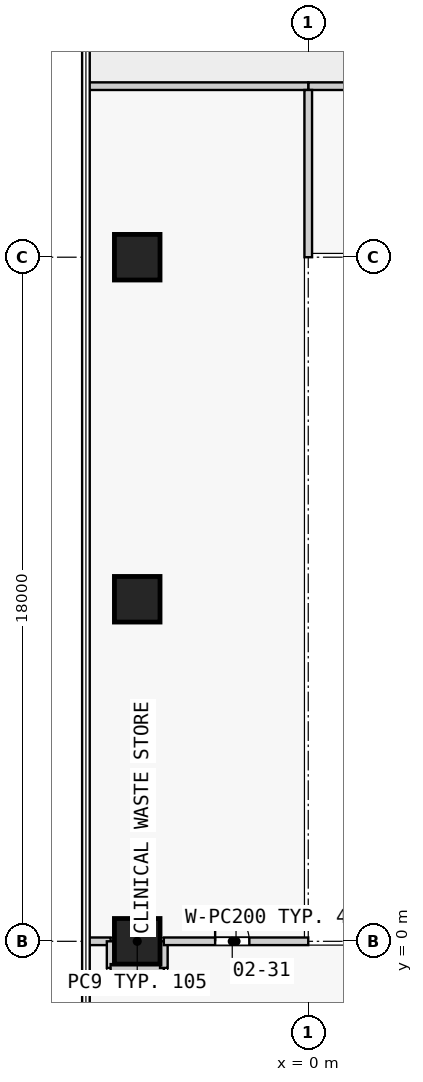
"""IFC4 building model, lengths in metres.
Left out: names, types, materials, properties, quantities, classifications, styles, units other than length and angle.
Written with IfcOpenShell. Run it as: python <this file> out.ifc"""

import sys

from ifc_helpers import new_model, si_unit, direction, frame, frame_2d, origin, origin_2d, place, context, subcontext, project, spatial, rectangle, extrude, element, fill, save


model = new_model("IFC4")
c1 = context("Model", 3, precision=1e-05, world=origin(), true_north=direction((0.0, 1.0)))
c2 = subcontext(c1, "Body", "Model", "MODEL_VIEW")
j1 = project(units=[si_unit("LENGTHUNIT", "METRE"), si_unit("PLANEANGLEUNIT", "RADIAN")], contexts=[c1])
p1 = place(None, origin())
s1 = spatial("IfcSite", under=j1, at=p1, CompositionType="ELEMENT")
p2 = place(p1, origin())
s2 = spatial("IfcBuilding", under=s1, at=p2, CompositionType="ELEMENT")
p3 = place(p2, frame((0.0, 0.0, 12.8)))
s3 = spatial("IfcBuildingStorey", under=s2, at=p3, CompositionType="ELEMENT", Elevation=12.8)
for number, where, z_axis, x_axis in (
    (1, (-4.5, 0.0, 0.0), (0.0, 0.0, 1.0), (1.0, 0.0, 0.0)),
    (2, (-4.5, 9.0, 0.0), (0.0, 0.0, 1.0), (1.0, 0.0, 0.0)),
    (3, (-4.5, 18.0, 0.0), (0.0, 0.0, 1.0), (1.0, 0.0, 0.0)),
):
    element("IfcColumn", number, at=place(p3, frame(where, z_axis=z_axis, x_axis=x_axis)), inside=s3, PredefinedType="COLUMN", context=c2, shape_type="SweptSolid", body=[
        extrude(rectangle(XDim=1.2, YDim=1.2, at=origin_2d()), origin(), (0.0, 0.0, 1.0), 4.5),
    ])
p4 = place(p3, frame((0.0, 22.5, 0.0), z_axis=(0.0, 0.0, 1.0), x_axis=(1.0, 0.0, 0.0)))
e4 = element("IfcWall", 4, at=p4, inside=s3, PredefinedType="PARTITIONING", context=c2, shape_type="SweptSolid", body=[
    extrude(rectangle(XDim=22.5, YDim=0.2, at=frame_2d((11.25, 0.0))), origin(), (0.0, 0.0, 1.0), 4.15),
])
p5 = place(p4, frame((10.35, 0.0, 0.0)))
e5 = element("IfcOpeningElement", 5, at=p5, cuts=e4, PredefinedType="OPENING", context=c2, shape_type="SweptSolid", body=[
    extrude(rectangle(XDim=1.8, YDim=2.1, at=frame_2d((0.9, 1.05))), frame((0.0, 0.11, 0.0), z_axis=(0.0, -1.0, 0.0), x_axis=(1.0, 0.0, 0.0)), (0.0, 0.0, 1.0), 0.22),
])
p6 = place(p3, frame((-5.85, 0.0, 0.0), z_axis=(0.0, 0.0, 1.0), x_axis=(1.0, 0.0, 0.0)))
e6 = element("IfcWall", 6, at=p6, inside=s3, PredefinedType="PARTITIONING", context=c2, shape_type="SweptSolid", body=[
    extrude(rectangle(XDim=0.65, YDim=0.2, at=frame_2d((0.325, 0.0))), origin(), (0.0, 0.0, 1.0), 4.15),
])
p7 = place(p3, frame((-5.2, 0.0, 0.0), z_axis=(0.0, 0.0, 1.0), x_axis=(0.0, -1.0, 0.0)))
e7 = element("IfcWall", 7, at=p7, inside=s3, PredefinedType="PARTITIONING", context=c2, shape_type="SweptSolid", body=[
    extrude(rectangle(XDim=0.7, YDim=0.2, at=frame_2d((0.35, 0.0))), origin(), (0.0, 0.0, 1.0), 4.15),
])
p8 = place(p3, frame((-5.2, -0.7, 0.0), z_axis=(0.0, 0.0, 1.0), x_axis=(1.0, 0.0, 0.0)))
e8 = element("IfcWall", 8, at=p8, inside=s3, PredefinedType="PARTITIONING", context=c2, shape_type="SweptSolid", body=[
    extrude(rectangle(XDim=1.4, YDim=0.2, at=frame_2d((0.7, 0.0))), origin(), (0.0, 0.0, 1.0), 3.45),
])
p9 = place(p3, frame((-3.8, -0.7, 0.0), z_axis=(0.0, 0.0, 1.0), x_axis=(0.0, 1.0, 0.0)))
e9 = element("IfcWall", 9, at=p9, inside=s3, PredefinedType="PARTITIONING", context=c2, shape_type="SweptSolid", body=[
    extrude(rectangle(XDim=0.7, YDim=0.2, at=frame_2d((0.35, 0.0))), origin(), (0.0, 0.0, 1.0), 4.15),
])
p10 = place(p3, frame((-3.8, 0.0, 0.0), z_axis=(0.0, 0.0, 1.0), x_axis=(1.0, 0.0, 0.0)))
e10 = element("IfcWall", 10, at=p10, inside=s3, PredefinedType="PARTITIONING", context=c2, shape_type="SweptSolid", body=[
    extrude(rectangle(XDim=3.8, YDim=0.2, at=frame_2d((1.9, 0.0))), origin(), (0.0, 0.0, 1.0), 4.15),
])
p11 = place(p10, frame((1.35, 0.0, 0.0)))
e11 = element("IfcOpeningElement", 11, at=p11, cuts=e10, PredefinedType="OPENING", context=c2, shape_type="SweptSolid", body=[
    extrude(rectangle(XDim=0.9, YDim=2.1, at=frame_2d((0.45, 1.05))), frame((0.0, 0.11, 0.0), z_axis=(0.0, -1.0, 0.0), x_axis=(1.0, 0.0, 0.0)), (0.0, 0.0, 1.0), 0.22),
])
p12 = place(p3, frame((0.0, 22.5, 0.0), z_axis=(0.0, 0.0, 1.0), x_axis=(-1.0, 0.0, 0.0)))
e12 = element("IfcWall", 12, at=p12, inside=s3, PredefinedType="PARTITIONING", context=c2, shape_type="SweptSolid", body=[
    extrude(rectangle(XDim=5.85, YDim=0.2, at=frame_2d((2.925, 0.0))), origin(), (0.0, 0.0, 1.0), 3.45),
])
p13 = place(p3, frame((0.0, 18.0, 0.0), z_axis=(0.0, 0.0, 1.0), x_axis=(0.0, 1.0, 0.0)))
e13 = element("IfcWall", 13, at=p13, inside=s3, PredefinedType="PARTITIONING", context=c2, shape_type="SweptSolid", body=[
    extrude(rectangle(XDim=4.4, YDim=0.2, at=frame_2d((2.2, 0.0))), origin(), (0.0, 0.0, 1.0), 4.15),
])
p14 = place(p11, origin())
e14 = element("IfcDoor", 14, at=p14, inside=s3, OperationType="SINGLE_SWING_LEFT", PredefinedType="DOOR", context=c2, shape_type="SweptSolid", body=[
    extrude(rectangle(XDim=0.9, YDim=2.1, at=frame_2d((0.45, 1.05))), frame((0.0, 0.025, 0.0), z_axis=(0.0, -1.0, 0.0), x_axis=(1.0, 0.0, 0.0)), (0.0, 0.0, 1.0), 0.05),
])
fill(e11, e14)
save(model, sys.argv[1])
